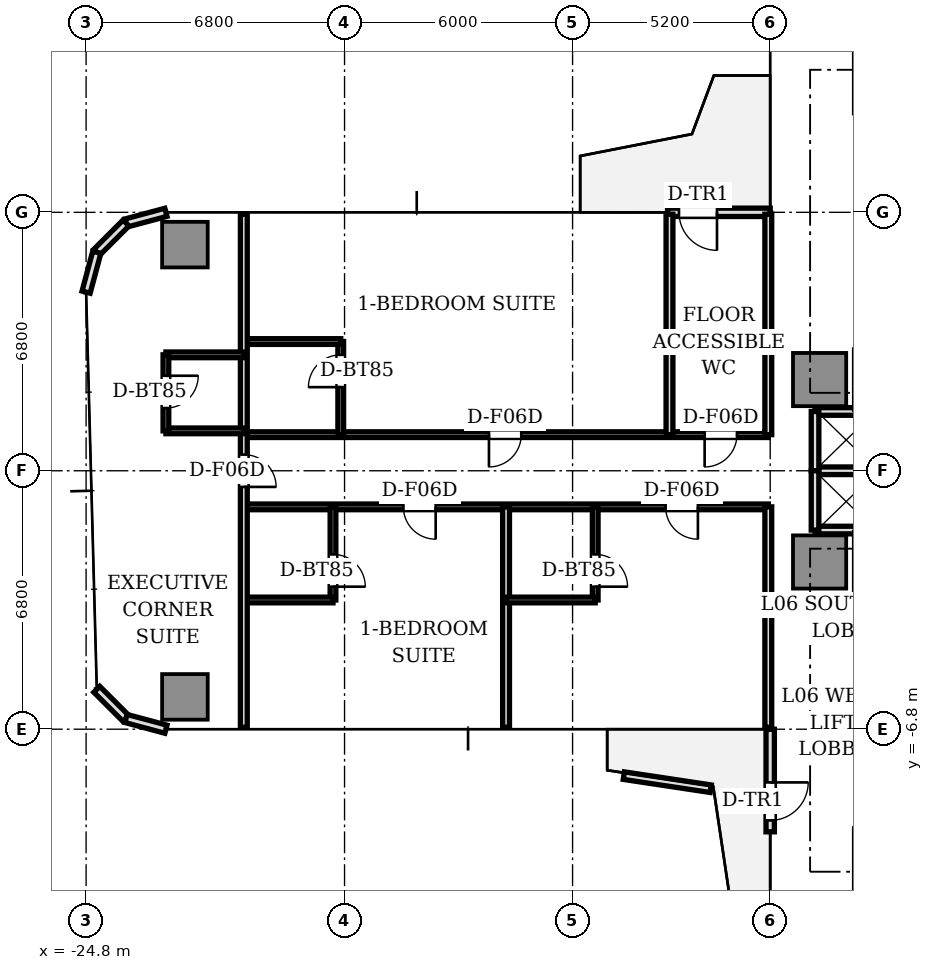
"""IFC4 building model, lengths in metres.
Left out: names, types, materials, properties, quantities, classifications, styles, units other than length and angle.
Written with IfcOpenShell. Run it as: python <this file> out.ifc"""

import sys

from ifc_helpers import new_model, si_unit, direction, frame, frame_2d, origin, origin_2d, place, context, subcontext, project, spatial, rectangle, extrude, source, transform, mapped, element, fill, save


model = new_model("IFC4")
c1 = context("Model", 3, precision=1e-05, world=origin(), true_north=direction((0.0, 1.0)))
c2 = subcontext(c1, "Body", "Model", "MODEL_VIEW")
j1 = project(units=[si_unit("LENGTHUNIT", "METRE"), si_unit("PLANEANGLEUNIT", "RADIAN")], contexts=[c1])
p1 = place(None, origin())
s1 = spatial("IfcSite", under=j1, at=p1, CompositionType="ELEMENT")
p2 = place(p1, origin())
s2 = spatial("IfcBuilding", under=s1, at=p2, CompositionType="ELEMENT")
p3 = place(p2, frame((0.0, 0.0, 26.45)))
s3 = spatial("IfcBuildingStorey", under=s2, at=p3, CompositionType="ELEMENT", Elevation=26.45)
m1 = source(origin(), c2, "Body", "SweptSolid", [
    extrude(rectangle(XDim=1.4, YDim=1.4, at=origin_2d()), origin(), (0.0, 0.0, 1.0), 3.11),
])
for number, where, z_axis, x_axis in (
    (1, (-5.5, 2.4, 0.0), (0.0, 0.0, 1.0), (1.0, 0.0, 0.0)),
    (2, (-5.5, -2.4, 0.0), (0.0, 0.0, 1.0), (1.0, 0.0, 0.0)),
):
    element("IfcColumn", number, at=place(p3, frame(where, z_axis=z_axis, x_axis=x_axis)), inside=s3, PredefinedType="COLUMN", context=c2, shape_type="MappedRepresentation", body=[
        mapped(m1, transform((0.0, 0.0, 0.0), scale=1.0)),
    ])
m2 = source(origin(), c2, "Body", "SweptSolid", [
    extrude(rectangle(XDim=1.2, YDim=1.2, at=origin_2d()), origin(), (0.0, 0.0, 1.0), 3.11),
])
for number, where, z_axis, x_axis in (
    (3, (-22.2, 5.95, 0.0), (0.0, 0.0, 1.0), (1.0, 0.0, 0.0)),
    (4, (-22.2, -5.95, 0.0), (0.0, 0.0, 1.0), (1.0, 0.0, 0.0)),
):
    element("IfcColumn", number, at=place(p3, frame(where, z_axis=z_axis, x_axis=x_axis)), inside=s3, PredefinedType="COLUMN", context=c2, shape_type="MappedRepresentation", body=[
        mapped(m2, transform((0.0, 0.0, 0.0), scale=1.0)),
    ])
p4 = place(p3, frame((-6.8, 6.8, 0.0), z_axis=(0.0, 0.0, 1.0), x_axis=(-1.0, 0.0, 0.0)))
e5 = element("IfcWall", 5, at=p4, inside=s3, PredefinedType="STANDARD", context=c2, shape_type="SweptSolid", body=[
    extrude(rectangle(XDim=2.7, YDim=0.22, at=frame_2d((1.35, 0.0))), origin(), (0.0, 0.0, 1.0), 3.11),
])
p5 = place(p4, frame((1.4, 0.0, 0.0)))
e6 = element("IfcOpeningElement", 6, at=p5, cuts=e5, PredefinedType="OPENING", context=c2, shape_type="SweptSolid", body=[
    extrude(rectangle(XDim=1.0, YDim=2.2, at=frame_2d((0.5, 1.1))), frame((0.0, 0.12, 0.0), z_axis=(0.0, -1.0, 0.0), x_axis=(1.0, 0.0, 0.0)), (0.0, 0.0, 1.0), 0.24),
])
for number, where, z_axis, x_axis in (
    (7, (-22.7, 6.8, 0.0), (0.0, 0.0, 1.0), (-0.966, -0.259, 0.0)),
    (8, (-23.75, 6.519, 0.0), (0.0, 0.0, 1.0), (-0.707, -0.707, 0.0)),
    (9, (-24.519, 5.75, 0.0), (0.0, 0.0, 1.0), (-0.259, -0.966, 0.0)),
    (10, (-24.519, -5.75, 0.0), (0.0, 0.0, 1.0), (0.707, -0.707, 0.0)),
    (11, (-23.75, -6.519, 0.0), (0.0, 0.0, 1.0), (0.966, -0.259, 0.0)),
):
    element("IfcWall", number, at=place(p3, frame(where, z_axis=z_axis, x_axis=x_axis)), inside=s3, PredefinedType="STANDARD", context=c2, shape_type="SweptSolid", body=[
        extrude(rectangle(XDim=1.087, YDim=0.22, at=frame_2d((0.543, 0.0))), origin(), (0.0, 0.0, 1.0), 3.11),
    ])
p6 = place(p3, frame((-6.8, -6.8, 0.0), z_axis=(0.0, 0.0, 1.0), x_axis=(0.0, -1.0, 0.0)))
e12 = element("IfcWall", 12, at=p6, inside=s3, PredefinedType="STANDARD", context=c2, shape_type="SweptSolid", body=[
    extrude(rectangle(XDim=2.7, YDim=0.22, at=frame_2d((1.35, 0.0))), origin(), (0.0, 0.0, 1.0), 3.11),
])
p7 = place(p6, frame((1.4, 0.0, 0.0)))
e13 = element("IfcOpeningElement", 13, at=p7, cuts=e12, PredefinedType="OPENING", context=c2, shape_type="SweptSolid", body=[
    extrude(rectangle(XDim=1.0, YDim=2.2, at=frame_2d((0.5, 1.1))), frame((0.0, 0.12, 0.0), z_axis=(0.0, -1.0, 0.0), x_axis=(1.0, 0.0, 0.0)), (0.0, 0.0, 1.0), 0.24),
])
p8 = place(p3, frame((-10.652, -8.022, 0.0), z_axis=(0.0, 0.0, 1.0), x_axis=(0.988844016989, -0.148954724882, 0.0)))
e14 = element("IfcWall", 14, at=p8, inside=s3, PredefinedType="PARAPET", context=c2, shape_type="SweptSolid", body=[
    extrude(rectangle(XDim=2.313, YDim=0.2, at=frame_2d((1.156, 0.0))), origin(), (0.0, 0.0, 1.0), 0.65),
])
for number, where, z_axis, x_axis in (
    (15, (-5.62, 1.56, 0.0), (0.0, 0.0, 1.0), (1.0, 0.0, 0.0)),
    (16, (-5.62, -1.56, 0.0), (0.0, 0.0, 1.0), (1.0, 0.0, 0.0)),
    (17, (-5.62, 0.0, 0.0), (0.0, 0.0, 1.0), (1.0, 0.0, 0.0)),
):
    element("IfcWall", number, at=place(p3, frame(where, z_axis=z_axis, x_axis=x_axis)), inside=s3, PredefinedType="SOLIDWALL", context=c2, shape_type="SweptSolid", body=[
        extrude(rectangle(XDim=1.64, YDim=0.2, at=frame_2d((0.82, 0.0))), origin(), (0.0, 0.0, 1.0), 2.66),
    ])
for number, where, z_axis, x_axis in (
    (18, (-5.62, 0.0, 0.0), (0.0, 0.0, 1.0), (0.0, 1.0, 0.0)),
    (19, (-5.62, -1.56, 0.0), (0.0, 0.0, 1.0), (0.0, 1.0, 0.0)),
):
    element("IfcWall", number, at=place(p3, frame(where, z_axis=z_axis, x_axis=x_axis)), inside=s3, PredefinedType="SOLIDWALL", context=c2, shape_type="SweptSolid", body=[
        extrude(rectangle(XDim=1.56, YDim=0.2, at=frame_2d((0.78, 0.0))), origin(), (0.0, 0.0, 1.0), 2.66),
    ])
p9 = place(p3, frame((-6.85, -0.95, 0.0), z_axis=(0.0, 0.0, 1.0), x_axis=(-1.0, 0.0, 0.0)))
e20 = element("IfcWall", 20, at=p9, inside=s3, PredefinedType="PARTITIONING", context=c2, shape_type="SweptSolid", body=[
    extrude(rectangle(XDim=13.8, YDim=0.15, at=frame_2d((6.9, 0.0))), origin(), (0.0, 0.0, 1.0), 2.66),
])
p10 = place(p9, frame((1.852, 0.0, 0.0)))
e21 = element("IfcOpeningElement", 21, at=p10, cuts=e20, PredefinedType="OPENING", context=c2, shape_type="SweptSolid", body=[
    extrude(rectangle(XDim=0.85, YDim=2.1, at=frame_2d((0.425, 1.05))), frame((0.0, 0.085, 0.0), z_axis=(0.0, -1.0, 0.0), x_axis=(1.0, 0.0, 0.0)), (0.0, 0.0, 1.0), 0.17),
])
p11 = place(p9, frame((8.752, 0.0, 0.0)))
e22 = element("IfcOpeningElement", 22, at=p11, cuts=e20, PredefinedType="OPENING", context=c2, shape_type="SweptSolid", body=[
    extrude(rectangle(XDim=0.85, YDim=2.1, at=frame_2d((0.425, 1.05))), frame((0.0, 0.085, 0.0), z_axis=(0.0, -1.0, 0.0), x_axis=(1.0, 0.0, 0.0)), (0.0, 0.0, 1.0), 0.17),
])
p12 = place(p3, frame((-6.85, 0.95, 0.0), z_axis=(0.0, 0.0, 1.0), x_axis=(-1.0, 0.0, 0.0)))
e23 = element("IfcWall", 23, at=p12, inside=s3, PredefinedType="PARTITIONING", context=c2, shape_type="SweptSolid", body=[
    extrude(rectangle(XDim=13.8, YDim=0.15, at=frame_2d((6.9, 0.0))), origin(), (0.0, 0.0, 1.0), 2.66),
])
p13 = place(p12, frame((0.825, 0.0, 0.0)))
e24 = element("IfcOpeningElement", 24, at=p13, cuts=e23, PredefinedType="OPENING", context=c2, shape_type="SweptSolid", body=[
    extrude(rectangle(XDim=0.85, YDim=2.1, at=frame_2d((0.425, 1.05))), frame((0.0, 0.085, 0.0), z_axis=(0.0, -1.0, 0.0), x_axis=(1.0, 0.0, 0.0)), (0.0, 0.0, 1.0), 0.17),
])
p14 = place(p12, frame((6.5, 0.0, 0.0)))
e25 = element("IfcOpeningElement", 25, at=p14, cuts=e23, PredefinedType="OPENING", context=c2, shape_type="SweptSolid", body=[
    extrude(rectangle(XDim=0.85, YDim=2.1, at=frame_2d((0.425, 1.05))), frame((0.0, 0.085, 0.0), z_axis=(0.0, -1.0, 0.0), x_axis=(1.0, 0.0, 0.0)), (0.0, 0.0, 1.0), 0.17),
])
for number, where, z_axis, x_axis in (
    (26, (-6.85, -0.95, 0.0), (0.0, 0.0, 1.0), (0.0, -1.0, 0.0)),
    (27, (-6.85, 6.75, 0.0), (0.0, 0.0, 1.0), (0.0, -1.0, 0.0)),
    (28, (-13.75, -0.95, 0.0), (0.0, 0.0, 1.0), (0.0, -1.0, 0.0)),
):
    element("IfcWall", number, at=place(p3, frame(where, z_axis=z_axis, x_axis=x_axis)), inside=s3, PredefinedType="PARTITIONING", context=c2, shape_type="SweptSolid", body=[
        extrude(rectangle(XDim=5.8, YDim=0.18, at=frame_2d((2.9, 0.0))), origin(), (0.0, 0.0, 1.0), 2.66),
    ])
p15 = place(p3, frame((-11.404, -0.95, 0.0), z_axis=(0.0, 0.0, 1.0), x_axis=(0.0, -1.0, 0.0)))
e29 = element("IfcWall", 29, at=p15, inside=s3, PredefinedType="PARTITIONING", context=c2, shape_type="SweptSolid", body=[
    extrude(rectangle(XDim=2.45, YDim=0.15, at=frame_2d((1.225, 0.0))), origin(), (0.0, 0.0, 1.0), 2.66),
])
p16 = place(p15, frame((1.25, 0.0, 0.0)))
e30 = element("IfcOpeningElement", 30, at=p16, cuts=e29, PredefinedType="OPENING", context=c2, shape_type="SweptSolid", body=[
    extrude(rectangle(XDim=0.85, YDim=2.1, at=frame_2d((0.425, 1.05))), frame((0.0, 0.085, 0.0), z_axis=(0.0, -1.0, 0.0), x_axis=(1.0, 0.0, 0.0)), (0.0, 0.0, 1.0), 0.17),
])
p17 = place(p3, frame((-11.404, -3.4, 0.0), z_axis=(0.0, 0.0, 1.0), x_axis=(-1.0, 0.0, 0.0)))
e31 = element("IfcWall", 31, at=p17, inside=s3, PredefinedType="PARTITIONING", context=c2, shape_type="SweptSolid", body=[
    extrude(rectangle(XDim=2.346, YDim=0.15, at=frame_2d((1.173, 0.0))), origin(), (0.0, 0.0, 1.0), 2.63),
])
p18 = place(p3, frame((-18.304, -0.95, 0.0), z_axis=(0.0, 0.0, 1.0), x_axis=(0.0, -1.0, 0.0)))
e32 = element("IfcWall", 32, at=p18, inside=s3, PredefinedType="PARTITIONING", context=c2, shape_type="SweptSolid", body=[
    extrude(rectangle(XDim=2.45, YDim=0.15, at=frame_2d((1.225, 0.0))), origin(), (0.0, 0.0, 1.0), 2.66),
])
p19 = place(p18, frame((1.25, 0.0, 0.0)))
e33 = element("IfcOpeningElement", 33, at=p19, cuts=e32, PredefinedType="OPENING", context=c2, shape_type="SweptSolid", body=[
    extrude(rectangle(XDim=0.85, YDim=2.1, at=frame_2d((0.425, 1.05))), frame((0.0, 0.085, 0.0), z_axis=(0.0, -1.0, 0.0), x_axis=(1.0, 0.0, 0.0)), (0.0, 0.0, 1.0), 0.17),
])
p20 = place(p3, frame((-18.304, -3.4, 0.0), z_axis=(0.0, 0.0, 1.0), x_axis=(-1.0, 0.0, 0.0)))
e34 = element("IfcWall", 34, at=p20, inside=s3, PredefinedType="PARTITIONING", context=c2, shape_type="SweptSolid", body=[
    extrude(rectangle(XDim=2.346, YDim=0.15, at=frame_2d((1.173, 0.0))), origin(), (0.0, 0.0, 1.0), 2.63),
])
p21 = place(p3, frame((-9.45, 0.95, 0.0), z_axis=(0.0, 0.0, 1.0), x_axis=(0.0, 1.0, 0.0)))
e35 = element("IfcWall", 35, at=p21, inside=s3, PredefinedType="PARTITIONING", context=c2, shape_type="SweptSolid", body=[
    extrude(rectangle(XDim=5.8, YDim=0.18, at=frame_2d((2.9, 0.0))), origin(), (0.0, 0.0, 1.0), 2.66),
])
p22 = place(p3, frame((-18.1, 0.95, 0.0), z_axis=(0.0, 0.0, 1.0), x_axis=(0.0, 1.0, 0.0)))
e36 = element("IfcWall", 36, at=p22, inside=s3, PredefinedType="PARTITIONING", context=c2, shape_type="SweptSolid", body=[
    extrude(rectangle(XDim=2.45, YDim=0.15, at=frame_2d((1.225, 0.0))), origin(), (0.0, 0.0, 1.0), 2.66),
])
p23 = place(p22, frame((1.25, 0.0, 0.0)))
e37 = element("IfcOpeningElement", 37, at=p23, cuts=e36, PredefinedType="OPENING", context=c2, shape_type="SweptSolid", body=[
    extrude(rectangle(XDim=0.85, YDim=2.1, at=frame_2d((0.425, 1.05))), frame((0.0, 0.085, 0.0), z_axis=(0.0, -1.0, 0.0), x_axis=(1.0, 0.0, 0.0)), (0.0, 0.0, 1.0), 0.17),
])
p24 = place(p3, frame((-18.1, 3.4, 0.0), z_axis=(0.0, 0.0, 1.0), x_axis=(-1.0, 0.0, 0.0)))
e38 = element("IfcWall", 38, at=p24, inside=s3, PredefinedType="PARTITIONING", context=c2, shape_type="SweptSolid", body=[
    extrude(rectangle(XDim=2.55, YDim=0.15, at=frame_2d((1.275, 0.0))), origin(), (0.0, 0.0, 1.0), 2.63),
])
p25 = place(p3, frame((-20.65, 6.75, 0.0), z_axis=(0.0, 0.0, 1.0), x_axis=(0.0, -1.0, 0.0)))
e39 = element("IfcWall", 39, at=p25, inside=s3, PredefinedType="PARTITIONING", context=c2, shape_type="SweptSolid", body=[
    extrude(rectangle(XDim=13.5, YDim=0.18, at=frame_2d((6.75, 0.0))), origin(), (0.0, 0.0, 1.0), 2.66),
])
p26 = place(p25, frame((6.325, 0.0, 0.0)))
e40 = element("IfcOpeningElement", 40, at=p26, cuts=e39, PredefinedType="OPENING", context=c2, shape_type="SweptSolid", body=[
    extrude(rectangle(XDim=0.85, YDim=2.1, at=frame_2d((0.425, 1.05))), frame((0.0, 0.1, 0.0), z_axis=(0.0, -1.0, 0.0), x_axis=(1.0, 0.0, 0.0)), (0.0, 0.0, 1.0), 0.2),
])
p27 = place(p3, frame((-20.65, 1.05, 0.0), z_axis=(0.0, 0.0, 1.0), x_axis=(-1.0, 0.0, 0.0)))
e41 = element("IfcWall", 41, at=p27, inside=s3, PredefinedType="PARTITIONING", context=c2, shape_type="SweptSolid", body=[
    extrude(rectangle(XDim=2.05, YDim=0.15, at=frame_2d((1.025, 0.0))), origin(), (0.0, 0.0, 1.0), 2.66),
])
p28 = place(p3, frame((-20.65, 3.05, 0.0), z_axis=(0.0, 0.0, 1.0), x_axis=(-1.0, 0.0, 0.0)))
e42 = element("IfcWall", 42, at=p28, inside=s3, PredefinedType="PARTITIONING", context=c2, shape_type="SweptSolid", body=[
    extrude(rectangle(XDim=2.05, YDim=0.15, at=frame_2d((1.025, 0.0))), origin(), (0.0, 0.0, 1.0), 2.63),
])
p29 = place(p3, frame((-22.7, 3.05, 0.0), z_axis=(0.0, 0.0, 1.0), x_axis=(0.0, -1.0, 0.0)))
e43 = element("IfcWall", 43, at=p29, inside=s3, PredefinedType="PARTITIONING", context=c2, shape_type="SweptSolid", body=[
    extrude(rectangle(XDim=2.0, YDim=0.15, at=frame_2d((1.0, 0.0))), origin(), (0.0, 0.0, 1.0), 2.66),
])
p30 = place(p29, frame((0.55, 0.0, 0.0)))
e44 = element("IfcOpeningElement", 44, at=p30, cuts=e43, PredefinedType="OPENING", context=c2, shape_type="SweptSolid", body=[
    extrude(rectangle(XDim=0.85, YDim=2.1, at=frame_2d((0.425, 1.05))), frame((0.0, 0.085, 0.0), z_axis=(0.0, -1.0, 0.0), x_axis=(1.0, 0.0, 0.0)), (0.0, 0.0, 1.0), 0.17),
])
m3 = source(origin(), c2, "Body", "SweptSolid", [
    extrude(rectangle(XDim=1.0, YDim=0.05, at=origin_2d()), origin(), (0.0, 0.0, 1.0), 2.2),
])
p31 = place(p5, frame((0.5, 0.0, 0.0)))
e45 = element("IfcDoor", 45, at=p31, inside=s3, OperationType="SINGLE_SWING_LEFT", PredefinedType="DOOR", context=c2, shape_type="MappedRepresentation", body=[
    mapped(m3, transform((0.0, 0.0, 0.0), scale=1.0)),
])
fill(e6, e45)
p32 = place(p7, frame((0.5, 0.0, 0.0)))
e46 = element("IfcDoor", 46, at=p32, inside=s3, OperationType="SINGLE_SWING_LEFT", PredefinedType="DOOR", context=c2, shape_type="MappedRepresentation", body=[
    mapped(m3, transform((0.0, 0.0, 0.0), scale=1.0)),
])
fill(e13, e46)
m4 = source(origin(), c2, "Body", "SweptSolid", [
    extrude(rectangle(XDim=0.85, YDim=0.05, at=origin_2d()), origin(), (0.0, 0.0, 1.0), 2.1),
])
p33 = place(p16, frame((0.425, 0.0, 0.0)))
e47 = element("IfcDoor", 47, at=p33, inside=s3, OperationType="SINGLE_SWING_RIGHT", PredefinedType="DOOR", context=c2, shape_type="MappedRepresentation", body=[
    mapped(m4, transform((0.0, 0.0, 0.0), scale=1.0)),
])
fill(e30, e47)
p34 = place(p10, frame((0.425, 0.0, 0.0)))
e48 = element("IfcDoor", 48, at=p34, inside=s3, OperationType="SINGLE_SWING_LEFT", PredefinedType="DOOR", context=c2, shape_type="MappedRepresentation", body=[
    mapped(m4, transform((0.0, 0.0, 0.0), scale=1.0)),
])
fill(e21, e48)
p35 = place(p19, frame((0.425, 0.0, 0.0)))
e49 = element("IfcDoor", 49, at=p35, inside=s3, OperationType="SINGLE_SWING_RIGHT", PredefinedType="DOOR", context=c2, shape_type="MappedRepresentation", body=[
    mapped(m4, transform((0.0, 0.0, 0.0), scale=1.0)),
])
fill(e33, e49)
p36 = place(p11, frame((0.425, 0.0, 0.0)))
e50 = element("IfcDoor", 50, at=p36, inside=s3, OperationType="SINGLE_SWING_LEFT", PredefinedType="DOOR", context=c2, shape_type="MappedRepresentation", body=[
    mapped(m4, transform((0.0, 0.0, 0.0), scale=1.0)),
])
fill(e22, e50)
p37 = place(p13, frame((0.425, 0.0, 0.0)))
e51 = element("IfcDoor", 51, at=p37, inside=s3, OperationType="SINGLE_SWING_RIGHT", PredefinedType="DOOR", context=c2, shape_type="MappedRepresentation", body=[
    mapped(m4, transform((0.0, 0.0, 0.0), scale=1.0)),
])
fill(e24, e51)
p38 = place(p23, frame((0.425, 0.0, 0.0)))
e52 = element("IfcDoor", 52, at=p38, inside=s3, OperationType="SINGLE_SWING_LEFT", PredefinedType="DOOR", context=c2, shape_type="MappedRepresentation", body=[
    mapped(m4, transform((0.0, 0.0, 0.0), scale=1.0)),
])
fill(e37, e52)
p39 = place(p14, frame((0.425, 0.0, 0.0)))
e53 = element("IfcDoor", 53, at=p39, inside=s3, OperationType="SINGLE_SWING_RIGHT", PredefinedType="DOOR", context=c2, shape_type="MappedRepresentation", body=[
    mapped(m4, transform((0.0, 0.0, 0.0), scale=1.0)),
])
fill(e25, e53)
p40 = place(p30, frame((0.425, 0.0, 0.0)))
e54 = element("IfcDoor", 54, at=p40, inside=s3, OperationType="SINGLE_SWING_LEFT", PredefinedType="DOOR", context=c2, shape_type="MappedRepresentation", body=[
    mapped(m4, transform((0.0, 0.0, 0.0), scale=1.0)),
])
fill(e44, e54)
p41 = place(p26, frame((0.425, 0.0, 0.0)))
e55 = element("IfcDoor", 55, at=p41, inside=s3, OperationType="SINGLE_SWING_RIGHT", PredefinedType="DOOR", context=c2, shape_type="MappedRepresentation", body=[
    mapped(m4, transform((0.0, 0.0, 0.0), scale=1.0)),
])
fill(e40, e55)
save(model, sys.argv[1])
